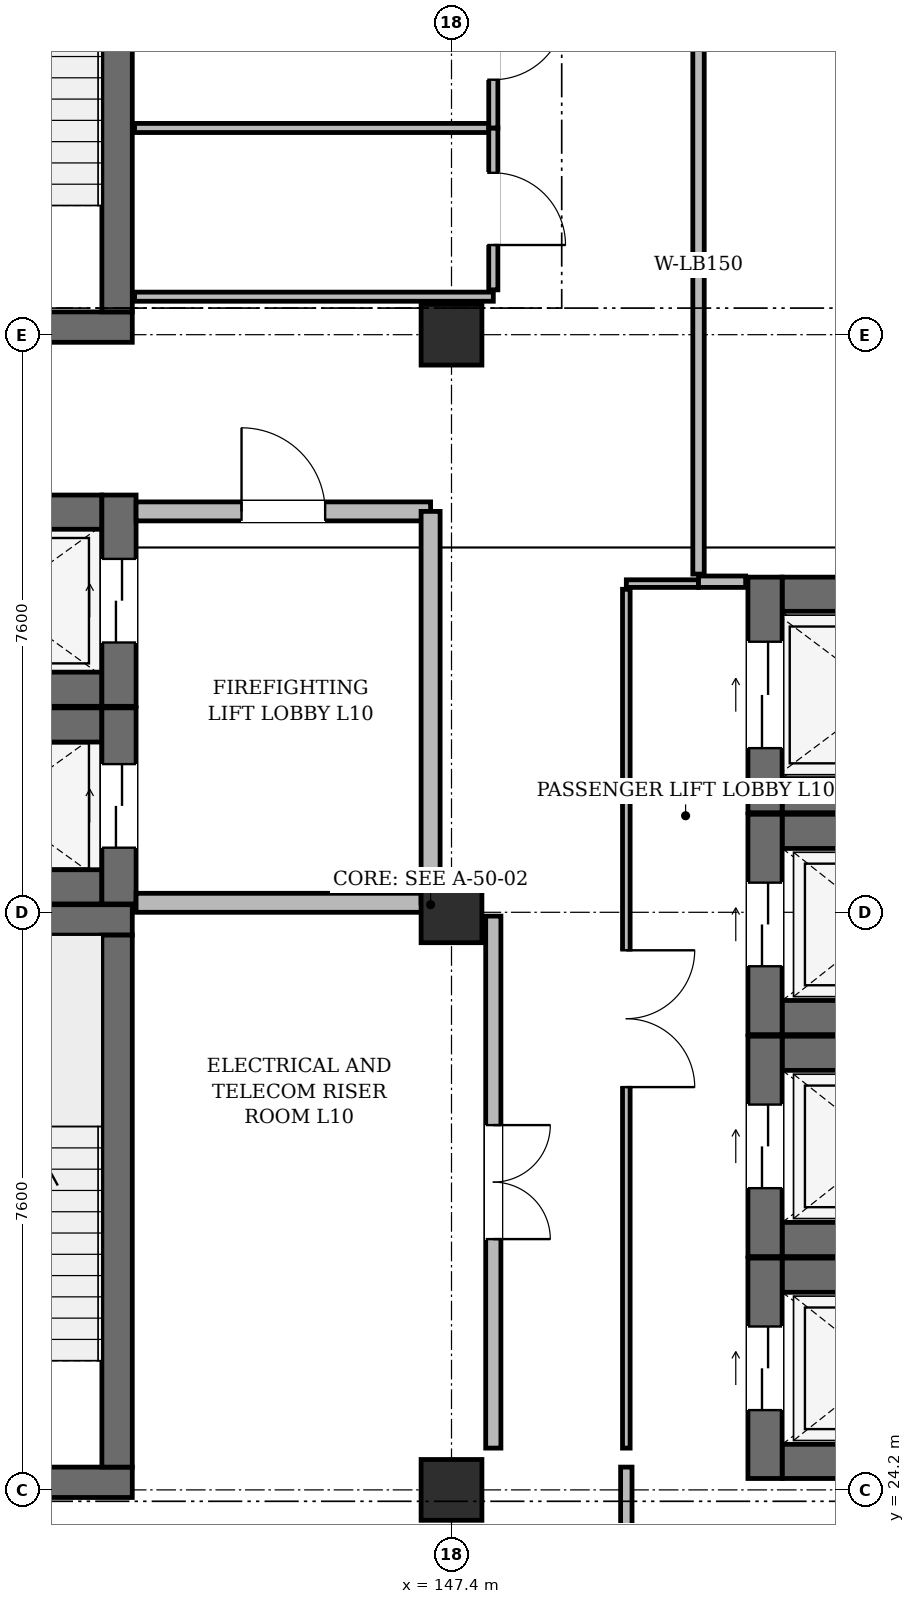
"""IFC4 building model, lengths in metres.
Left out: names, types, materials, properties, quantities, classifications, styles, units other than length and angle.
Written with IfcOpenShell. Run it as: python <this file> out.ifc"""

import sys

from ifc_helpers import new_model, si_unit, direction, frame, frame_2d, origin, origin_2d, place, context, subcontext, project, spatial, rectangle, extrude, element, fill, save


model = new_model("IFC4")
c1 = context("Model", 3, precision=1e-05, world=origin(), true_north=direction((0.0, 1.0)))
c2 = subcontext(c1, "Body", "Model", "MODEL_VIEW")
j1 = project(units=[si_unit("LENGTHUNIT", "METRE"), si_unit("PLANEANGLEUNIT", "RADIAN")], contexts=[c1])
p1 = place(None, origin())
s1 = spatial("IfcSite", under=j1, at=p1, CompositionType="ELEMENT")
p2 = place(p1, origin())
s2 = spatial("IfcBuilding", under=s1, at=p2, CompositionType="ELEMENT")
p3 = place(p2, frame((0.0, 0.0, 45.0)))
s3 = spatial("IfcBuildingStorey", under=s2, at=p3, CompositionType="ELEMENT", Elevation=45.0)
for number, where, z_axis, x_axis in (
    (1, (147.4, 24.2, 0.0), (0.0, 0.0, 1.0), (1.0, 0.0, 0.0)),
    (2, (147.4, 31.8, 0.0), (0.0, 0.0, 1.0), (1.0, 0.0, 0.0)),
    (3, (147.4, 39.4, 0.0), (0.0, 0.0, 1.0), (1.0, 0.0, 0.0)),
):
    element("IfcColumn", number, at=place(p3, frame(where, z_axis=z_axis, x_axis=x_axis)), inside=s3, PredefinedType="COLUMN", context=c2, shape_type="SweptSolid", body=[
        extrude(rectangle(XDim=0.8, YDim=0.8, at=origin_2d()), origin(), (0.0, 0.0, 1.0), 3.95),
    ])
p4 = place(p3, frame((139.4, 24.3, 0.0), z_axis=(0.0, 0.0, 1.0), x_axis=(1.0, 0.0, 0.0)))
e4 = element("IfcWall", 4, at=p4, inside=s3, PredefinedType="SHEAR", context=c2, shape_type="SweptSolid", body=[
    extrude(rectangle(XDim=3.8, YDim=0.4, at=frame_2d((1.9, 0.0))), origin(), (0.0, 0.0, 1.0), 3.95),
])
p5 = place(p4, frame((1.3, 0.0, 0.0)))
e5 = element("IfcOpeningElement", 5, at=p5, cuts=e4, PredefinedType="OPENING", context=c2, shape_type="SweptSolid", body=[
    extrude(rectangle(XDim=1.2, YDim=2.2, at=frame_2d((0.6, 1.1))), frame((0.0, 0.212, 0.0), z_axis=(0.0, -1.0, 0.0), x_axis=(1.0, 0.0, 0.0)), (0.0, 0.0, 1.0), 0.424),
])
p6 = place(p3, frame((139.4, 31.7, 0.0), z_axis=(0.0, 0.0, 1.0), x_axis=(1.0, 0.0, 0.0)))
e6 = element("IfcWall", 6, at=p6, inside=s3, PredefinedType="SHEAR", context=c2, shape_type="SweptSolid", body=[
    extrude(rectangle(XDim=3.8, YDim=0.4, at=frame_2d((1.9, 0.0))), origin(), (0.0, 0.0, 1.0), 3.95),
])
p7 = place(p3, frame((143.0, 24.5, 0.0), z_axis=(0.0, 0.0, 1.0), x_axis=(0.0, 1.0, 0.0)))
e7 = element("IfcWall", 7, at=p7, inside=s3, PredefinedType="SHEAR", context=c2, shape_type="SweptSolid", body=[
    extrude(rectangle(XDim=7.0, YDim=0.4, at=frame_2d((3.5, 0.0))), origin(), (0.0, 0.0, 1.0), 3.95),
])
p8 = place(p3, frame((139.4, 39.5, 0.0), z_axis=(0.0, 0.0, 1.0), x_axis=(1.0, 0.0, 0.0)))
e8 = element("IfcWall", 8, at=p8, inside=s3, PredefinedType="SHEAR", context=c2, shape_type="SweptSolid", body=[
    extrude(rectangle(XDim=3.8, YDim=0.4, at=frame_2d((1.9, 0.0))), origin(), (0.0, 0.0, 1.0), 3.95),
])
p9 = place(p8, frame((1.3, 0.0, 0.0)))
e9 = element("IfcOpeningElement", 9, at=p9, cuts=e8, PredefinedType="OPENING", context=c2, shape_type="SweptSolid", body=[
    extrude(rectangle(XDim=1.2, YDim=2.2, at=frame_2d((0.6, 1.1))), frame((0.0, 0.212, 0.0), z_axis=(0.0, -1.0, 0.0), x_axis=(1.0, 0.0, 0.0)), (0.0, 0.0, 1.0), 0.424),
])
p10 = place(p3, frame((143.0, 39.7, 0.0), z_axis=(0.0, 0.0, 1.0), x_axis=(0.0, 1.0, 0.0)))
e10 = element("IfcWall", 10, at=p10, inside=s3, PredefinedType="SHEAR", context=c2, shape_type="SweptSolid", body=[
    extrude(rectangle(XDim=7.0, YDim=0.4, at=frame_2d((3.5, 0.0))), origin(), (0.0, 0.0, 1.0), 3.95),
])
for number, where, z_axis, x_axis in (
    (11, (140.06, 32.135, 0.0), (0.0, 0.0, 1.0), (1.0, 0.0, 0.0)),
    (12, (140.06, 34.265, 0.0), (0.0, 0.0, 1.0), (1.0, 0.0, 0.0)),
):
    element("IfcWall", number, at=place(p3, frame(where, z_axis=z_axis, x_axis=x_axis)), inside=s3, PredefinedType="SHEAR", context=c2, shape_type="SweptSolid", body=[
        extrude(rectangle(XDim=2.74, YDim=0.45, at=frame_2d((1.37, 0.0))), origin(), (0.0, 0.0, 1.0), 3.95),
    ])
p11 = place(p3, frame((143.025, 31.91, 0.0), z_axis=(0.0, 0.0, 1.0), x_axis=(0.0, 1.0, 0.0)))
e13 = element("IfcWall", 13, at=p11, inside=s3, PredefinedType="SHEAR", context=c2, shape_type="SweptSolid", body=[
    extrude(rectangle(XDim=2.58, YDim=0.45, at=frame_2d((1.29, 0.0))), origin(), (0.0, 0.0, 1.0), 3.95),
])
p12 = place(p11, frame((0.74, 0.0, 0.0)))
e14 = element("IfcOpeningElement", 14, at=p12, cuts=e13, PredefinedType="OPENING", context=c2, shape_type="SweptSolid", body=[
    extrude(rectangle(XDim=1.1, YDim=2.2, at=frame_2d((0.55, 1.1))), frame((0.0, 0.237, 0.0), z_axis=(0.0, -1.0, 0.0), x_axis=(1.0, 0.0, 0.0)), (0.0, 0.0, 1.0), 0.474),
])
for number, where, z_axis, x_axis in (
    (15, (140.06, 34.735, 0.0), (0.0, 0.0, 1.0), (1.0, 0.0, 0.0)),
    (16, (140.06, 37.065, 0.0), (0.0, 0.0, 1.0), (1.0, 0.0, 0.0)),
):
    element("IfcWall", number, at=place(p3, frame(where, z_axis=z_axis, x_axis=x_axis)), inside=s3, PredefinedType="SHEAR", context=c2, shape_type="SweptSolid", body=[
        extrude(rectangle(XDim=2.74, YDim=0.45, at=frame_2d((1.37, 0.0))), origin(), (0.0, 0.0, 1.0), 3.95),
    ])
p13 = place(p3, frame((143.025, 34.51, 0.0), z_axis=(0.0, 0.0, 1.0), x_axis=(0.0, 1.0, 0.0)))
e17 = element("IfcWall", 17, at=p13, inside=s3, PredefinedType="SHEAR", context=c2, shape_type="SweptSolid", body=[
    extrude(rectangle(XDim=2.78, YDim=0.45, at=frame_2d((1.39, 0.0))), origin(), (0.0, 0.0, 1.0), 3.95),
])
p14 = place(p13, frame((0.84, 0.0, 0.0)))
e18 = element("IfcOpeningElement", 18, at=p14, cuts=e17, PredefinedType="OPENING", context=c2, shape_type="SweptSolid", body=[
    extrude(rectangle(XDim=1.1, YDim=2.2, at=frame_2d((0.55, 1.1))), frame((0.0, 0.237, 0.0), z_axis=(0.0, -1.0, 0.0), x_axis=(1.0, 0.0, 0.0)), (0.0, 0.0, 1.0), 0.474),
])
for number, where, z_axis, x_axis in (
    (19, (151.75, 24.575, 0.0), (0.0, 0.0, 1.0), (1.0, 0.0, 0.0)),
    (20, (151.75, 27.025, 0.0), (0.0, 0.0, 1.0), (1.0, 0.0, 0.0)),
):
    element("IfcWall", number, at=place(p3, frame(where, z_axis=z_axis, x_axis=x_axis)), inside=s3, PredefinedType="SHEAR", context=c2, shape_type="SweptSolid", body=[
        extrude(rectangle(XDim=2.7, YDim=0.45, at=frame_2d((1.35, 0.0))), origin(), (0.0, 0.0, 1.0), 3.95),
    ])
p15 = place(p3, frame((151.525, 24.35, 0.0), z_axis=(0.0, 0.0, 1.0), x_axis=(0.0, 1.0, 0.0)))
e21 = element("IfcWall", 21, at=p15, inside=s3, PredefinedType="SHEAR", context=c2, shape_type="SweptSolid", body=[
    extrude(rectangle(XDim=2.9, YDim=0.45, at=frame_2d((1.45, 0.0))), origin(), (0.0, 0.0, 1.0), 3.95),
])
p16 = place(p15, frame((0.9, 0.0, 0.0)))
e22 = element("IfcOpeningElement", 22, at=p16, cuts=e21, PredefinedType="OPENING", context=c2, shape_type="SweptSolid", body=[
    extrude(rectangle(XDim=1.1, YDim=2.2, at=frame_2d((0.55, 1.1))), frame((0.0, 0.237, 0.0), z_axis=(0.0, -1.0, 0.0), x_axis=(1.0, 0.0, 0.0)), (0.0, 0.0, 1.0), 0.474),
])
for number, where, z_axis, x_axis in (
    (23, (151.75, 27.495, 0.0), (0.0, 0.0, 1.0), (1.0, 0.0, 0.0)),
    (24, (151.75, 29.945, 0.0), (0.0, 0.0, 1.0), (1.0, 0.0, 0.0)),
):
    element("IfcWall", number, at=place(p3, frame(where, z_axis=z_axis, x_axis=x_axis)), inside=s3, PredefinedType="SHEAR", context=c2, shape_type="SweptSolid", body=[
        extrude(rectangle(XDim=2.7, YDim=0.45, at=frame_2d((1.35, 0.0))), origin(), (0.0, 0.0, 1.0), 3.95),
    ])
p17 = place(p3, frame((151.525, 27.27, 0.0), z_axis=(0.0, 0.0, 1.0), x_axis=(0.0, 1.0, 0.0)))
e25 = element("IfcWall", 25, at=p17, inside=s3, PredefinedType="SHEAR", context=c2, shape_type="SweptSolid", body=[
    extrude(rectangle(XDim=2.9, YDim=0.45, at=frame_2d((1.45, 0.0))), origin(), (0.0, 0.0, 1.0), 3.95),
])
p18 = place(p17, frame((0.9, 0.0, 0.0)))
e26 = element("IfcOpeningElement", 26, at=p18, cuts=e25, PredefinedType="OPENING", context=c2, shape_type="SweptSolid", body=[
    extrude(rectangle(XDim=1.1, YDim=2.2, at=frame_2d((0.55, 1.1))), frame((0.0, 0.237, 0.0), z_axis=(0.0, -1.0, 0.0), x_axis=(1.0, 0.0, 0.0)), (0.0, 0.0, 1.0), 0.474),
])
for number, where, z_axis, x_axis in (
    (27, (151.75, 30.415, 0.0), (0.0, 0.0, 1.0), (1.0, 0.0, 0.0)),
    (28, (151.75, 32.865, 0.0), (0.0, 0.0, 1.0), (1.0, 0.0, 0.0)),
):
    element("IfcWall", number, at=place(p3, frame(where, z_axis=z_axis, x_axis=x_axis)), inside=s3, PredefinedType="SHEAR", context=c2, shape_type="SweptSolid", body=[
        extrude(rectangle(XDim=2.7, YDim=0.45, at=frame_2d((1.35, 0.0))), origin(), (0.0, 0.0, 1.0), 3.95),
    ])
p19 = place(p3, frame((151.525, 30.19, 0.0), z_axis=(0.0, 0.0, 1.0), x_axis=(0.0, 1.0, 0.0)))
e29 = element("IfcWall", 29, at=p19, inside=s3, PredefinedType="SHEAR", context=c2, shape_type="SweptSolid", body=[
    extrude(rectangle(XDim=2.9, YDim=0.45, at=frame_2d((1.45, 0.0))), origin(), (0.0, 0.0, 1.0), 3.95),
])
p20 = place(p19, frame((0.9, 0.0, 0.0)))
e30 = element("IfcOpeningElement", 30, at=p20, cuts=e29, PredefinedType="OPENING", context=c2, shape_type="SweptSolid", body=[
    extrude(rectangle(XDim=1.1, YDim=2.2, at=frame_2d((0.55, 1.1))), frame((0.0, 0.237, 0.0), z_axis=(0.0, -1.0, 0.0), x_axis=(1.0, 0.0, 0.0)), (0.0, 0.0, 1.0), 0.474),
])
for number, where, z_axis, x_axis in (
    (31, (151.75, 33.335, 0.0), (0.0, 0.0, 1.0), (1.0, 0.0, 0.0)),
    (32, (151.75, 35.985, 0.0), (0.0, 0.0, 1.0), (1.0, 0.0, 0.0)),
):
    element("IfcWall", number, at=place(p3, frame(where, z_axis=z_axis, x_axis=x_axis)), inside=s3, PredefinedType="SHEAR", context=c2, shape_type="SweptSolid", body=[
        extrude(rectangle(XDim=2.7, YDim=0.45, at=frame_2d((1.35, 0.0))), origin(), (0.0, 0.0, 1.0), 3.95),
    ])
p21 = place(p3, frame((151.525, 33.11, 0.0), z_axis=(0.0, 0.0, 1.0), x_axis=(0.0, 1.0, 0.0)))
e33 = element("IfcWall", 33, at=p21, inside=s3, PredefinedType="SHEAR", context=c2, shape_type="SweptSolid", body=[
    extrude(rectangle(XDim=3.1, YDim=0.45, at=frame_2d((1.55, 0.0))), origin(), (0.0, 0.0, 1.0), 3.95),
])
p22 = place(p21, frame((0.85, 0.0, 0.0)))
e34 = element("IfcOpeningElement", 34, at=p22, cuts=e33, PredefinedType="OPENING", context=c2, shape_type="SweptSolid", body=[
    extrude(rectangle(XDim=1.4, YDim=2.3, at=frame_2d((0.7, 1.15))), frame((0.0, 0.237, 0.0), z_axis=(0.0, -1.0, 0.0), x_axis=(1.0, 0.0, 0.0)), (0.0, 0.0, 1.0), 0.474),
])
p23 = place(p3, frame((143.25, 37.075, 0.0), z_axis=(0.0, 0.0, 1.0), x_axis=(1.0, 0.0, 0.0)))
e35 = element("IfcWall", 35, at=p23, inside=s3, PredefinedType="SOLIDWALL", context=c2, shape_type="SweptSolid", body=[
    extrude(rectangle(XDim=3.875, YDim=0.25, at=frame_2d((1.938, 0.0))), origin(), (0.0, 0.0, 1.0), 3.805),
])
p24 = place(p23, frame((1.387, 0.0, 0.0)))
e36 = element("IfcOpeningElement", 36, at=p24, cuts=e35, PredefinedType="OPENING", context=c2, shape_type="SweptSolid", body=[
    extrude(rectangle(XDim=1.1, YDim=2.2, at=frame_2d((0.55, 1.1))), frame((0.0, 0.137, 0.0), z_axis=(0.0, -1.0, 0.0), x_axis=(1.0, 0.0, 0.0)), (0.0, 0.0, 1.0), 0.274),
])
p25 = place(p3, frame((143.25, 31.925, 0.0), z_axis=(0.0, 0.0, 1.0), x_axis=(1.0, 0.0, 0.0)))
e37 = element("IfcWall", 37, at=p25, inside=s3, PredefinedType="SOLIDWALL", context=c2, shape_type="SweptSolid", body=[
    extrude(rectangle(XDim=3.875, YDim=0.25, at=frame_2d((1.938, 0.0))), origin(), (0.0, 0.0, 1.0), 3.285),
])
p26 = place(p3, frame((147.125, 31.925, 0.0), z_axis=(0.0, 0.0, 1.0), x_axis=(0.0, 1.0, 0.0)))
e38 = element("IfcWall", 38, at=p26, inside=s3, PredefinedType="SOLIDWALL", context=c2, shape_type="SweptSolid", body=[
    extrude(rectangle(XDim=5.15, YDim=0.25, at=frame_2d((2.575, 0.0))), origin(), (0.0, 0.0, 1.0), 3.285),
])
p27 = place(p3, frame((143.23, 39.9, 0.0), z_axis=(0.0, 0.0, 1.0), x_axis=(1.0, 0.0, 0.0)))
e39 = element("IfcWall", 39, at=p27, inside=s3, PredefinedType="PARTITIONING", context=c2, shape_type="SweptSolid", body=[
    extrude(rectangle(XDim=4.72, YDim=0.12, at=frame_2d((2.36, 0.0))), origin(), (0.0, 0.0, 1.0), 3.805),
])
p28 = place(p3, frame((147.95, 31.75, 0.0), z_axis=(0.0, 0.0, 1.0), x_axis=(0.0, -1.0, 0.0)))
e40 = element("IfcWall", 40, at=p28, inside=s3, PredefinedType="PARTITIONING", context=c2, shape_type="SweptSolid", body=[
    extrude(rectangle(XDim=7.0, YDim=0.2, at=frame_2d((3.5, 0.0))), origin(), (0.0, 0.0, 1.0), 3.805),
])
p29 = place(p28, frame((2.75, 0.0, 0.0)))
e41 = element("IfcOpeningElement", 41, at=p29, cuts=e40, PredefinedType="OPENING", context=c2, shape_type="SweptSolid", body=[
    extrude(rectangle(XDim=1.5, YDim=2.2, at=frame_2d((0.75, 1.1))), frame((0.0, 0.112, 0.0), z_axis=(0.0, -1.0, 0.0), x_axis=(1.0, 0.0, 0.0)), (0.0, 0.0, 1.0), 0.224),
])
p30 = place(p3, frame((149.7, 24.75, 0.0), z_axis=(0.0, 0.0, 1.0), x_axis=(0.0, 1.0, 0.0)))
e42 = element("IfcWall", 42, at=p30, inside=s3, PredefinedType="PARTITIONING", context=c2, shape_type="SweptSolid", body=[
    extrude(rectangle(XDim=11.3, YDim=0.1, at=frame_2d((5.65, 0.0))), origin(), (0.0, 0.0, 1.0), 3.805),
])
p31 = place(p30, frame((4.75, 0.0, 0.0)))
e43 = element("IfcOpeningElement", 43, at=p31, cuts=e42, PredefinedType="OPENING", context=c2, shape_type="SweptSolid", body=[
    extrude(rectangle(XDim=1.8, YDim=2.4, at=frame_2d((0.9, 1.2))), frame((0.0, 0.062, 0.0), z_axis=(0.0, -1.0, 0.0), x_axis=(1.0, 0.0, 0.0)), (0.0, 0.0, 1.0), 0.124),
])
p32 = place(p3, frame((149.7, 36.125, 0.0), z_axis=(0.0, 0.0, 1.0), x_axis=(1.0, 0.0, 0.0)))
e44 = element("IfcWall", 44, at=p32, inside=s3, PredefinedType="PARTITIONING", context=c2, shape_type="SweptSolid", body=[
    extrude(rectangle(XDim=0.95, YDim=0.1, at=frame_2d((0.475, 0.0))), origin(), (0.0, 0.0, 1.0), 3.805),
])
p33 = place(p3, frame((150.65, 36.15, 0.0), z_axis=(0.0, 0.0, 1.0), x_axis=(1.0, 0.0, 0.0)))
e45 = element("IfcWall", 45, at=p33, inside=s3, PredefinedType="PARTITIONING", context=c2, shape_type="SweptSolid", body=[
    extrude(rectangle(XDim=0.62, YDim=0.15, at=frame_2d((0.31, 0.0))), origin(), (0.0, 0.0, 1.0), 3.805),
])
p34 = place(p3, frame((143.23, 42.12, 0.0), z_axis=(0.0, 0.0, 1.0), x_axis=(1.0, 0.0, 0.0)))
e46 = element("IfcWall", 46, at=p34, inside=s3, PredefinedType="PARTITIONING", context=c2, shape_type="SweptSolid", body=[
    extrude(rectangle(XDim=4.72, YDim=0.12, at=frame_2d((2.36, 0.0))), origin(), (0.0, 0.0, 1.0), 3.425),
])
p35 = place(p3, frame((147.95, 42.12, 0.0), z_axis=(0.0, 0.0, 1.0), x_axis=(0.0, -1.0, 0.0)))
e47 = element("IfcWall", 47, at=p35, inside=s3, PredefinedType="PARTITIONING", context=c2, shape_type="SweptSolid", body=[
    extrude(rectangle(XDim=2.13, YDim=0.12, at=frame_2d((1.065, 0.0))), origin(), (0.0, 0.0, 1.0), 3.805),
])
p36 = place(p35, frame((0.59, 0.0, 0.0)))
e48 = element("IfcOpeningElement", 48, at=p36, cuts=e47, PredefinedType="OPENING", context=c2, shape_type="SweptSolid", body=[
    extrude(rectangle(XDim=0.95, YDim=2.15, at=frame_2d((0.475, 1.075))), frame((0.0, 0.072, 0.0), z_axis=(0.0, -1.0, 0.0), x_axis=(1.0, 0.0, 0.0)), (0.0, 0.0, 1.0), 0.144),
])
p37 = place(p3, frame((147.95, 44.34, 0.0), z_axis=(0.0, 0.0, 1.0), x_axis=(0.0, -1.0, 0.0)))
e49 = element("IfcWall", 49, at=p37, inside=s3, PredefinedType="PARTITIONING", context=c2, shape_type="SweptSolid", body=[
    extrude(rectangle(XDim=2.22, YDim=0.12, at=frame_2d((1.11, 0.0))), origin(), (0.0, 0.0, 1.0), 3.805),
])
p38 = place(p37, frame((0.635, 0.0, 0.0)))
e50 = element("IfcOpeningElement", 50, at=p38, cuts=e49, PredefinedType="OPENING", context=c2, shape_type="SweptSolid", body=[
    extrude(rectangle(XDim=0.95, YDim=2.15, at=frame_2d((0.475, 1.075))), frame((0.0, 0.072, 0.0), z_axis=(0.0, -1.0, 0.0), x_axis=(1.0, 0.0, 0.0)), (0.0, 0.0, 1.0), 0.144),
])
p39 = place(p3, frame((149.7, 24.5, 0.0), z_axis=(0.0, 0.0, 1.0), x_axis=(0.0, -1.0, 0.0)))
e51 = element("IfcWall", 51, at=p39, inside=s3, PredefinedType="PARTITIONING", context=c2, shape_type="SweptSolid", body=[
    extrude(rectangle(XDim=0.8, YDim=0.15, at=frame_2d((0.4, 0.0))), origin(), (0.0, 0.0, 1.0), 3.805),
])
p40 = place(p3, frame((150.65, 54.6, 0.0), z_axis=(0.0, 0.0, 1.0), x_axis=(0.0, -1.0, 0.0)))
e52 = element("IfcWall", 52, at=p40, inside=s3, PredefinedType="PARTITIONING", context=c2, shape_type="SweptSolid", body=[
    extrude(rectangle(XDim=18.35, YDim=0.15, at=frame_2d((9.175, 0.0))), origin(), (0.0, 0.0, 1.0), 3.805),
])
p41 = place(p40, frame((8.475, 0.0, 0.0)))
e53 = element("IfcOpeningElement", 53, at=p41, cuts=e52, PredefinedType="OPENING", context=c2, shape_type="SweptSolid", body=[
    extrude(rectangle(XDim=1.4, YDim=2.2, at=frame_2d((0.7, 1.1))), frame((0.0, 0.087, 0.0), z_axis=(0.0, -1.0, 0.0), x_axis=(1.0, 0.0, 0.0)), (0.0, 0.0, 1.0), 0.174),
])
p42 = place(p12, origin())
e54 = element("IfcDoor", 54, at=p42, inside=s3, OperationType="DOUBLE_DOOR_SLIDING", PredefinedType="DOOR", context=c2, shape_type="SweptSolid", body=[
    extrude(rectangle(XDim=1.1, YDim=2.2, at=frame_2d((0.55, 1.1))), frame((0.0, 0.025, 0.0), z_axis=(0.0, -1.0, 0.0), x_axis=(1.0, 0.0, 0.0)), (0.0, 0.0, 1.0), 0.05),
])
fill(e14, e54)
p43 = place(p14, origin())
e55 = element("IfcDoor", 55, at=p43, inside=s3, OperationType="DOUBLE_DOOR_SLIDING", PredefinedType="DOOR", context=c2, shape_type="SweptSolid", body=[
    extrude(rectangle(XDim=1.1, YDim=2.2, at=frame_2d((0.55, 1.1))), frame((0.0, 0.025, 0.0), z_axis=(0.0, -1.0, 0.0), x_axis=(1.0, 0.0, 0.0)), (0.0, 0.0, 1.0), 0.05),
])
fill(e18, e55)
p44 = place(p16, origin())
e56 = element("IfcDoor", 56, at=p44, inside=s3, OperationType="DOUBLE_DOOR_SLIDING", PredefinedType="DOOR", context=c2, shape_type="SweptSolid", body=[
    extrude(rectangle(XDim=1.1, YDim=2.2, at=frame_2d((0.55, 1.1))), frame((0.0, 0.025, 0.0), z_axis=(0.0, -1.0, 0.0), x_axis=(1.0, 0.0, 0.0)), (0.0, 0.0, 1.0), 0.05),
])
fill(e22, e56)
p45 = place(p18, origin())
e57 = element("IfcDoor", 57, at=p45, inside=s3, OperationType="DOUBLE_DOOR_SLIDING", PredefinedType="DOOR", context=c2, shape_type="SweptSolid", body=[
    extrude(rectangle(XDim=1.1, YDim=2.2, at=frame_2d((0.55, 1.1))), frame((0.0, 0.025, 0.0), z_axis=(0.0, -1.0, 0.0), x_axis=(1.0, 0.0, 0.0)), (0.0, 0.0, 1.0), 0.05),
])
fill(e26, e57)
p46 = place(p20, origin())
e58 = element("IfcDoor", 58, at=p46, inside=s3, OperationType="DOUBLE_DOOR_SLIDING", PredefinedType="DOOR", context=c2, shape_type="SweptSolid", body=[
    extrude(rectangle(XDim=1.1, YDim=2.2, at=frame_2d((0.55, 1.1))), frame((0.0, 0.025, 0.0), z_axis=(0.0, -1.0, 0.0), x_axis=(1.0, 0.0, 0.0)), (0.0, 0.0, 1.0), 0.05),
])
fill(e30, e58)
p47 = place(p22, origin())
e59 = element("IfcDoor", 59, at=p47, inside=s3, OperationType="DOUBLE_DOOR_SLIDING", PredefinedType="DOOR", context=c2, shape_type="SweptSolid", body=[
    extrude(rectangle(XDim=1.4, YDim=2.3, at=frame_2d((0.7, 1.15))), frame((0.0, 0.025, 0.0), z_axis=(0.0, -1.0, 0.0), x_axis=(1.0, 0.0, 0.0)), (0.0, 0.0, 1.0), 0.05),
])
fill(e34, e59)
p48 = place(p24, origin())
e60 = element("IfcDoor", 60, at=p48, inside=s3, OperationType="SINGLE_SWING_LEFT", PredefinedType="DOOR", context=c2, shape_type="SweptSolid", body=[
    extrude(rectangle(XDim=1.1, YDim=2.2, at=frame_2d((0.55, 1.1))), frame((0.0, 0.025, 0.0), z_axis=(0.0, -1.0, 0.0), x_axis=(1.0, 0.0, 0.0)), (0.0, 0.0, 1.0), 0.05),
])
fill(e36, e60)
p49 = place(p29, origin())
e61 = element("IfcDoor", 61, at=p49, inside=s3, OperationType="DOUBLE_DOOR_SINGLE_SWING", PredefinedType="DOOR", context=c2, shape_type="SweptSolid", body=[
    extrude(rectangle(XDim=1.5, YDim=2.2, at=frame_2d((0.75, 1.1))), frame((0.0, 0.025, 0.0), z_axis=(0.0, -1.0, 0.0), x_axis=(1.0, 0.0, 0.0)), (0.0, 0.0, 1.0), 0.05),
])
fill(e41, e61)
p50 = place(p31, frame((1.8, 0.0, 0.0), z_axis=(0.0, 0.0, 1.0), x_axis=(-1.0, 0.0, 0.0)))
e62 = element("IfcDoor", 62, at=p50, inside=s3, OperationType="DOUBLE_DOOR_SINGLE_SWING", PredefinedType="DOOR", context=c2, shape_type="SweptSolid", body=[
    extrude(rectangle(XDim=1.8, YDim=2.4, at=frame_2d((0.9, 1.2))), frame((0.0, 0.025, 0.0), z_axis=(0.0, -1.0, 0.0), x_axis=(1.0, 0.0, 0.0)), (0.0, 0.0, 1.0), 0.05),
])
fill(e43, e62)
p51 = place(p36, origin())
e63 = element("IfcDoor", 63, at=p51, inside=s3, OperationType="SINGLE_SWING_RIGHT", PredefinedType="DOOR", context=c2, shape_type="SweptSolid", body=[
    extrude(rectangle(XDim=0.95, YDim=2.15, at=frame_2d((0.475, 1.075))), frame((0.0, 0.025, 0.0), z_axis=(0.0, -1.0, 0.0), x_axis=(1.0, 0.0, 0.0)), (0.0, 0.0, 1.0), 0.05),
])
fill(e48, e63)
p52 = place(p38, origin())
e64 = element("IfcDoor", 64, at=p52, inside=s3, OperationType="SINGLE_SWING_LEFT", PredefinedType="DOOR", context=c2, shape_type="SweptSolid", body=[
    extrude(rectangle(XDim=0.95, YDim=2.15, at=frame_2d((0.475, 1.075))), frame((0.0, 0.025, 0.0), z_axis=(0.0, -1.0, 0.0), x_axis=(1.0, 0.0, 0.0)), (0.0, 0.0, 1.0), 0.05),
])
fill(e50, e64)
save(model, sys.argv[1])
